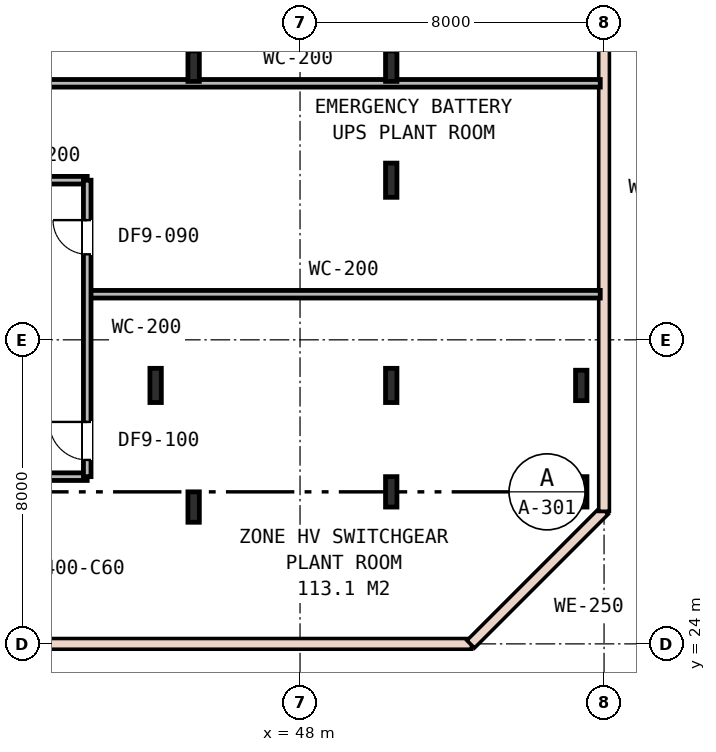
"""IFC4 building model, lengths in metres.
Left out: names, types, materials, properties, quantities, classifications, styles, units other than length and angle.
Written with IfcOpenShell. Run it as: python <this file> out.ifc"""

import sys

from ifc_helpers import new_model, si_unit, direction, frame, frame_2d, origin, origin_2d, place, context, subcontext, project, spatial, rectangle, i_section, extrude, element, fill, save


model = new_model("IFC4")
c1 = context("Model", 3, precision=1e-05, world=origin(), true_north=direction((0.0, 1.0)))
c2 = subcontext(c1, "Body", "Model", "MODEL_VIEW")
j1 = project(units=[si_unit("LENGTHUNIT", "METRE"), si_unit("PLANEANGLEUNIT", "RADIAN")], contexts=[c1])
p1 = place(None, origin())
s1 = spatial("IfcSite", under=j1, at=p1, CompositionType="ELEMENT")
p2 = place(p1, origin())
s2 = spatial("IfcBuilding", under=s1, at=p2, CompositionType="ELEMENT")
p3 = place(p2, frame((0.0, 0.0, 79.8)))
s3 = spatial("IfcBuildingStorey", under=s2, at=p3, CompositionType="ELEMENT", Elevation=79.8)
for number, where, z_axis, x_axis in (
    (1, (45.2, 27.6, 0.0), (0.0, 0.0, 1.0), (1.0, 0.0, 0.0)),
    (2, (45.2, 39.2, 0.0), (0.0, 0.0, 1.0), (1.0, 0.0, 0.0)),
    (3, (50.4, 28.0, 0.0), (0.0, 0.0, 1.0), (1.0, 0.0, 0.0)),
    (4, (50.4, 39.2, 0.0), (0.0, 0.0, 1.0), (1.0, 0.0, 0.0)),
):
    element("IfcColumn", number, at=place(p3, frame(where, z_axis=z_axis, x_axis=x_axis)), inside=s3, PredefinedType="COLUMN", context=c2, shape_type="SweptSolid", body=[
        extrude(i_section(OverallWidth=0.3, OverallDepth=0.8, WebThickness=0.018, FlangeThickness=0.033, FilletRadius=0.03, at=origin_2d()), origin(), (0.0, 0.0, 1.0), 4.8),
    ])
for number, where, z_axis, x_axis in (
    (5, (55.4, 28.0, 0.0), (0.0, 0.0, 1.0), (1.0, 0.0, 0.0)),
    (6, (55.4, 30.8, 0.0), (0.0, 0.0, 1.0), (1.0, 0.0, 0.0)),
):
    element("IfcColumn", number, at=place(p3, frame(where, z_axis=z_axis, x_axis=x_axis)), inside=s3, PredefinedType="COLUMN", context=c2, shape_type="SweptSolid", body=[
        extrude(i_section(OverallWidth=0.3, OverallDepth=0.8, WebThickness=0.018, FlangeThickness=0.033, FilletRadius=0.03, at=origin_2d()), origin(), (0.0, 0.0, 1.0), 4.05),
    ])
for number, where, z_axis, x_axis in (
    (7, (44.2, 30.8, 0.0), (0.0, 0.0, 1.0), (1.0, 0.0, 0.0)),
    (8, (50.4, 30.8, 0.0), (0.0, 0.0, 1.0), (1.0, 0.0, 0.0)),
    (9, (50.4, 36.2, 0.0), (0.0, 0.0, 1.0), (1.0, 0.0, 0.0)),
):
    element("IfcColumn", number, at=place(p3, frame(where, z_axis=z_axis, x_axis=x_axis)), inside=s3, PredefinedType="COLUMN", context=c2, shape_type="SweptSolid", body=[
        extrude(i_section(OverallWidth=0.3, OverallDepth=0.9, WebThickness=0.018, FlangeThickness=0.035, FilletRadius=0.03, at=origin_2d()), origin(), (0.0, 0.0, 1.0), 4.8),
    ])
p4 = place(p3, frame((40.2, 24.0, 0.0), z_axis=(0.0, 0.0, 1.0), x_axis=(1.0, 0.0, 0.0)))
e10 = element("IfcWall", 10, at=p4, inside=s3, PredefinedType="STANDARD", context=c2, shape_type="SweptSolid", body=[
    extrude(rectangle(XDim=12.3, YDim=0.25, at=frame_2d((6.15, 0.0))), origin(), (0.0, 0.0, 1.0), 1.15),
])
p5 = place(p3, frame((52.5, 24.0, 0.0), z_axis=(0.0, 0.0, 1.0), x_axis=(0.707106781187, 0.707106781187, 0.0)))
e11 = element("IfcWall", 11, at=p5, inside=s3, PredefinedType="STANDARD", context=c2, shape_type="SweptSolid", body=[
    extrude(rectangle(XDim=4.95, YDim=0.25, at=frame_2d((2.475, 0.0))), origin(), (0.0, 0.0, 1.0), 1.15),
])
p6 = place(p3, frame((56.0, 27.5, 0.0), z_axis=(0.0, 0.0, 1.0), x_axis=(0.0, 1.0, 0.0)))
e12 = element("IfcWall", 12, at=p6, inside=s3, PredefinedType="STANDARD", context=c2, shape_type="SweptSolid", body=[
    extrude(rectangle(XDim=17.0, YDim=0.25, at=frame_2d((8.5, 0.0))), origin(), (0.0, 0.0, 1.0), 1.15),
])
p7 = place(p3, frame((40.0, 38.75, 0.0), z_axis=(0.0, 0.0, 1.0), x_axis=(1.0, 0.0, 0.0)))
e13 = element("IfcWall", 13, at=p7, inside=s3, PredefinedType="PARTITIONING", context=c2, shape_type="SweptSolid", body=[
    extrude(rectangle(XDim=15.9, YDim=0.2, at=frame_2d((7.95, 0.0))), origin(), (0.0, 0.0, 1.0), 3.94),
])
p8 = place(p3, frame((39.9, 28.4, 0.0), z_axis=(0.0, 0.0, 1.0), x_axis=(1.0, 0.0, 0.0)))
e14 = element("IfcWall", 14, at=p8, inside=s3, PredefinedType="PARTITIONING", context=c2, shape_type="SweptSolid", body=[
    extrude(rectangle(XDim=2.5, YDim=0.2, at=frame_2d((1.25, 0.0))), origin(), (0.0, 0.0, 1.0), 3.94),
])
p9 = place(p3, frame((42.4, 33.2, 0.0), z_axis=(0.0, 0.0, 1.0), x_axis=(1.0, 0.0, 0.0)))
e15 = element("IfcWall", 15, at=p9, inside=s3, PredefinedType="PARTITIONING", context=c2, shape_type="SweptSolid", body=[
    extrude(rectangle(XDim=13.5, YDim=0.2, at=frame_2d((6.75, 0.0))), origin(), (0.0, 0.0, 1.0), 3.94),
])
p10 = place(p3, frame((40.2, 36.2, 0.0), z_axis=(0.0, 0.0, 1.0), x_axis=(1.0, 0.0, 0.0)))
e16 = element("IfcWall", 16, at=p10, inside=s3, PredefinedType="PARTITIONING", context=c2, shape_type="SweptSolid", body=[
    extrude(rectangle(XDim=2.2, YDim=0.2, at=frame_2d((1.1, 0.0))), origin(), (0.0, 0.0, 1.0), 4.02),
])
p11 = place(p3, frame((42.4, 28.4, 0.0), z_axis=(0.0, 0.0, 1.0), x_axis=(0.0, 1.0, 0.0)))
e17 = element("IfcWall", 17, at=p11, inside=s3, PredefinedType="PARTITIONING", context=c2, shape_type="SweptSolid", body=[
    extrude(rectangle(XDim=7.8, YDim=0.2, at=frame_2d((3.9, 0.0))), origin(), (0.0, 0.0, 1.0), 3.94),
])
p12 = place(p11, frame((0.44, 0.0, 0.0)))
e18 = element("IfcOpeningElement", 18, at=p12, cuts=e17, PredefinedType="OPENING", context=c2, shape_type="SweptSolid", body=[
    extrude(rectangle(XDim=1.0, YDim=2.15, at=frame_2d((0.5, 1.075))), frame((0.0, 0.11, 0.0), z_axis=(0.0, -1.0, 0.0), x_axis=(1.0, 0.0, 0.0)), (0.0, 0.0, 1.0), 0.22),
])
p13 = place(p11, frame((5.85, 0.0, 0.0)))
e19 = element("IfcOpeningElement", 19, at=p13, cuts=e17, PredefinedType="OPENING", context=c2, shape_type="SweptSolid", body=[
    extrude(rectangle(XDim=0.9, YDim=2.15, at=frame_2d((0.45, 1.075))), frame((0.0, 0.11, 0.0), z_axis=(0.0, -1.0, 0.0), x_axis=(1.0, 0.0, 0.0)), (0.0, 0.0, 1.0), 0.22),
])
p14 = place(p12, origin())
e20 = element("IfcDoor", 20, at=p14, inside=s3, OperationType="SINGLE_SWING_RIGHT", PredefinedType="DOOR", context=c2, shape_type="SweptSolid", body=[
    extrude(rectangle(XDim=1.0, YDim=2.15, at=frame_2d((0.5, 1.075))), frame((0.0, 0.025, 0.0), z_axis=(0.0, -1.0, 0.0), x_axis=(1.0, 0.0, 0.0)), (0.0, 0.0, 1.0), 0.05),
])
fill(e18, e20)
p15 = place(p13, origin())
e21 = element("IfcDoor", 21, at=p15, inside=s3, OperationType="SINGLE_SWING_RIGHT", PredefinedType="DOOR", context=c2, shape_type="SweptSolid", body=[
    extrude(rectangle(XDim=0.9, YDim=2.15, at=frame_2d((0.45, 1.075))), frame((0.0, 0.025, 0.0), z_axis=(0.0, -1.0, 0.0), x_axis=(1.0, 0.0, 0.0)), (0.0, 0.0, 1.0), 0.05),
])
fill(e19, e21)
save(model, sys.argv[1])
